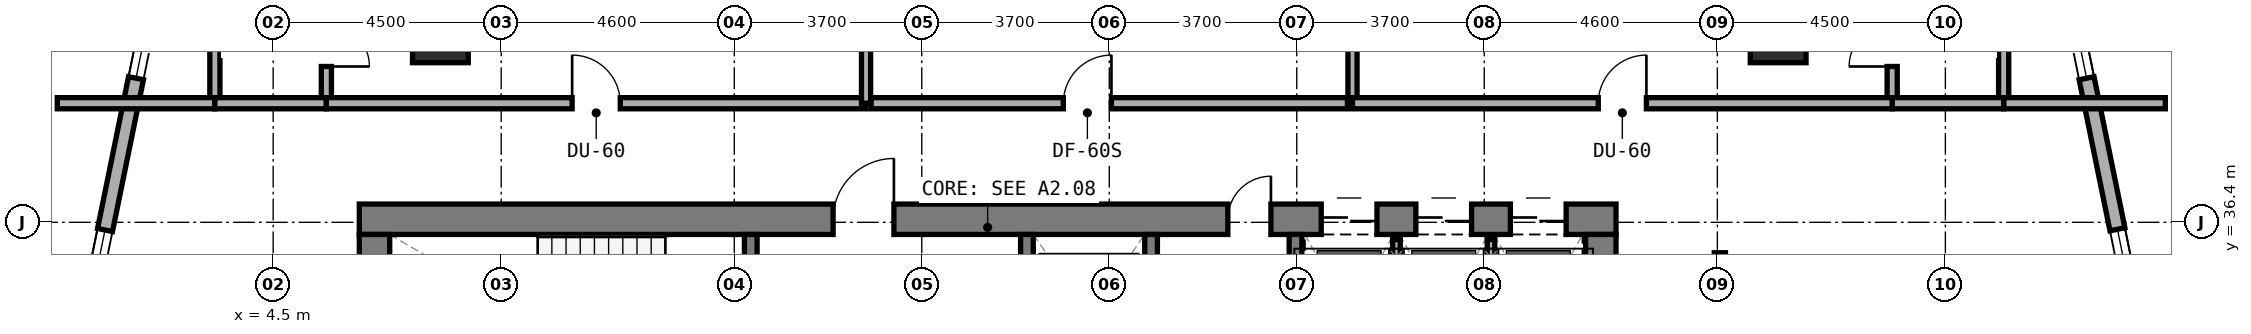
"""IFC4 building model, lengths in metres.
Left out: names, types, materials, properties, quantities, classifications, styles, units other than length and angle.
Written with IfcOpenShell. Run it as: python <this file> out.ifc"""

import sys

from ifc_helpers import new_model, si_unit, direction, frame, frame_2d, origin, origin_2d, place, context, subcontext, project, spatial, rectangle, extrude, element, fill, save


model = new_model("IFC4")
c1 = context("Model", 3, precision=1e-05, world=origin(), true_north=direction((0.0, 1.0)))
c2 = subcontext(c1, "Body", "Model", "MODEL_VIEW")
j1 = project(units=[si_unit("LENGTHUNIT", "METRE"), si_unit("PLANEANGLEUNIT", "RADIAN")], contexts=[c1])
p1 = place(None, origin())
s1 = spatial("IfcSite", under=j1, at=p1, CompositionType="ELEMENT")
p2 = place(p1, origin())
s2 = spatial("IfcBuilding", under=s1, at=p2, CompositionType="ELEMENT")
p3 = place(p2, frame((0.0, 0.0, 24.0)))
s3 = spatial("IfcBuildingStorey", under=s2, at=p3, CompositionType="ELEMENT", Elevation=24.0)
p4 = place(p3, frame((6.2, 36.46, 0.0), z_axis=(0.0, 0.0, 1.0), x_axis=(1.0, 0.0, 0.0)))
e1 = element("IfcWall", 1, at=p4, inside=s3, PredefinedType="SHEAR", context=c2, shape_type="SweptSolid", body=[
    extrude(rectangle(XDim=24.8, YDim=0.6, at=frame_2d((12.4, 0.0))), origin(), (0.0, 0.0, 1.0), 3.5),
])
p5 = place(p4, frame((9.35, 0.0, 0.0)))
e2 = element("IfcOpeningElement", 2, at=p5, cuts=e1, PredefinedType="OPENING", context=c2, shape_type="SweptSolid", body=[
    extrude(rectangle(XDim=1.2, YDim=2.15, at=frame_2d((0.6, 1.075))), frame((0.0, 0.31, 0.0), z_axis=(0.0, -1.0, 0.0), x_axis=(1.0, 0.0, 0.0)), (0.0, 0.0, 1.0), 0.62),
])
p6 = place(p4, frame((17.14, 0.0, 0.0)))
e3 = element("IfcOpeningElement", 3, at=p6, cuts=e1, PredefinedType="OPENING", context=c2, shape_type="SweptSolid", body=[
    extrude(rectangle(XDim=0.85, YDim=2.1, at=frame_2d((0.425, 1.05))), frame((0.0, 0.31, 0.0), z_axis=(0.0, -1.0, 0.0), x_axis=(1.0, 0.0, 0.0)), (0.0, 0.0, 1.0), 0.62),
])
p7 = place(p4, frame((18.983, 0.0, 0.0)))
e4 = element("IfcOpeningElement", 4, at=p7, cuts=e1, PredefinedType="OPENING", context=c2, shape_type="SweptSolid", body=[
    extrude(rectangle(XDim=1.1, YDim=2.15, at=frame_2d((0.55, 1.075))), frame((0.0, 0.31, 0.0), z_axis=(0.0, -1.0, 0.0), x_axis=(1.0, 0.0, 0.0)), (0.0, 0.0, 1.0), 0.62),
])
p8 = place(p4, frame((20.85, 0.0, 0.0)))
e5 = element("IfcOpeningElement", 5, at=p8, cuts=e1, PredefinedType="OPENING", context=c2, shape_type="SweptSolid", body=[
    extrude(rectangle(XDim=1.1, YDim=2.15, at=frame_2d((0.55, 1.075))), frame((0.0, 0.31, 0.0), z_axis=(0.0, -1.0, 0.0), x_axis=(1.0, 0.0, 0.0)), (0.0, 0.0, 1.0), 0.62),
])
p9 = place(p4, frame((22.716, 0.0, 0.0)))
e6 = element("IfcOpeningElement", 6, at=p9, cuts=e1, PredefinedType="OPENING", context=c2, shape_type="SweptSolid", body=[
    extrude(rectangle(XDim=1.1, YDim=2.15, at=frame_2d((0.55, 1.075))), frame((0.0, 0.31, 0.0), z_axis=(0.0, -1.0, 0.0), x_axis=(1.0, 0.0, 0.0)), (0.0, 0.0, 1.0), 0.62),
])
for number, where, z_axis, x_axis in (
    (7, (6.5, 33.0, 0.0), (0.0, 0.0, 1.0), (0.0, 1.0, 0.0)),
    (8, (30.7, 33.0, 0.0), (0.0, 0.0, 1.0), (0.0, 1.0, 0.0)),
):
    element("IfcWall", number, at=place(p3, frame(where, z_axis=z_axis, x_axis=x_axis)), inside=s3, PredefinedType="SHEAR", context=c2, shape_type="SweptSolid", body=[
        extrude(rectangle(XDim=3.16, YDim=0.6, at=frame_2d((1.58, 0.0))), origin(), (0.0, 0.0, 1.0), 3.5),
    ])
p10 = place(p3, frame((13.925, 33.0, 0.0), z_axis=(0.0, 0.0, 1.0), x_axis=(0.0, 1.0, 0.0)))
e9 = element("IfcWall", 9, at=p10, inside=s3, PredefinedType="STANDARD", context=c2, shape_type="SweptSolid", body=[
    extrude(rectangle(XDim=3.16, YDim=0.25, at=frame_2d((1.58, 0.0))), origin(), (0.0, 0.0, 1.0), 3.22),
])
p11 = place(p10, frame((0.98, 0.0, 0.0)))
e10 = element("IfcOpeningElement", 10, at=p11, cuts=e9, PredefinedType="OPENING", context=c2, shape_type="SweptSolid", body=[
    extrude(rectangle(XDim=1.1, YDim=2.15, at=frame_2d((0.55, 1.075))), frame((0.0, 0.135, 0.0), z_axis=(0.0, -1.0, 0.0), x_axis=(1.0, 0.0, 0.0)), (0.0, 0.0, 1.0), 0.27),
])
p12 = place(p3, frame((19.375, 33.0, 0.0), z_axis=(0.0, 0.0, 1.0), x_axis=(0.0, 1.0, 0.0)))
e11 = element("IfcWall", 11, at=p12, inside=s3, PredefinedType="STANDARD", context=c2, shape_type="SweptSolid", body=[
    extrude(rectangle(XDim=3.16, YDim=0.25, at=frame_2d((1.58, 0.0))), origin(), (0.0, 0.0, 1.0), 3.22),
])
p13 = place(p12, frame((0.98, 0.0, 0.0)))
e12 = element("IfcOpeningElement", 12, at=p13, cuts=e11, PredefinedType="OPENING", context=c2, shape_type="SweptSolid", body=[
    extrude(rectangle(XDim=1.1, YDim=2.15, at=frame_2d((0.55, 1.075))), frame((0.0, 0.135, 0.0), z_axis=(0.0, -1.0, 0.0), x_axis=(1.0, 0.0, 0.0)), (0.0, 0.0, 1.0), 0.27),
])
for number, where, z_axis, x_axis in (
    (13, (21.825, 33.0, 0.0), (0.0, 0.0, 1.0), (0.0, 1.0, 0.0)),
    (14, (24.675, 33.0, 0.0), (0.0, 0.0, 1.0), (0.0, 1.0, 0.0)),
):
    element("IfcWall", number, at=place(p3, frame(where, z_axis=z_axis, x_axis=x_axis)), inside=s3, PredefinedType="STANDARD", context=c2, shape_type="SweptSolid", body=[
        extrude(rectangle(XDim=3.16, YDim=0.25, at=frame_2d((1.58, 0.0))), origin(), (0.0, 0.0, 1.0), 3.22),
    ])
for number, where, z_axis, x_axis in (
    (15, (34.2, 40.2, 0.0), (0.0, 0.0, 1.0), (1.0, 0.0, 0.0)),
    (16, (7.8, 40.2, 0.0), (0.0, 0.0, 1.0), (1.0, 0.0, 0.0)),
):
    element("IfcColumn", number, at=place(p3, frame(where, z_axis=z_axis, x_axis=x_axis)), inside=s3, PredefinedType="COLUMN", context=c2, shape_type="SweptSolid", body=[
        extrude(rectangle(XDim=1.1, YDim=1.3, at=origin_2d()), origin(), (0.0, 0.0, 1.0), 3.5),
    ])
p14 = place(p3, frame((41.858, 31.546, 0.0), z_axis=(0.0, 0.0, 1.0), x_axis=(-0.19998861198, 0.979798221614, 0.0)))
e17 = element("IfcWall", 17, at=p14, inside=s3, PredefinedType="STANDARD", context=c2, shape_type="SweptSolid", body=[
    extrude(rectangle(XDim=10.035, YDim=0.3, at=frame_2d((5.017, 0.0))), origin(), (0.0, 0.0, 1.0), 3.22),
])
p15 = place(p14, frame((2.414, 0.0, 0.8)))
e18 = element("IfcOpeningElement", 18, at=p15, cuts=e17, PredefinedType="OPENING", context=c2, shape_type="SweptSolid", body=[
    extrude(rectangle(XDim=2.4, YDim=1.6, at=frame_2d((1.2, 0.8))), frame((0.0, 0.16, 0.0), z_axis=(0.0, -1.0, 0.0), x_axis=(1.0, 0.0, 0.0)), (0.0, 0.0, 1.0), 0.32),
])
p16 = place(p14, frame((7.856, 0.0, 0.85)))
e19 = element("IfcOpeningElement", 19, at=p16, cuts=e17, PredefinedType="OPENING", context=c2, shape_type="SweptSolid", body=[
    extrude(rectangle(XDim=1.8, YDim=1.5, at=frame_2d((0.9, 0.75))), frame((0.0, 0.16, 0.0), z_axis=(0.0, -1.0, 0.0), x_axis=(1.0, 0.0, 0.0)), (0.0, 0.0, 1.0), 0.32),
])
p17 = place(p3, frame((2.229, 41.378, 0.0), z_axis=(0.0, 0.0, 1.0), x_axis=(-0.199990901713, -0.979797754249, 0.0)))
e20 = element("IfcWall", 20, at=p17, inside=s3, PredefinedType="STANDARD", context=c2, shape_type="SweptSolid", body=[
    extrude(rectangle(XDim=10.065, YDim=0.3, at=frame_2d((5.033, 0.0))), origin(), (0.0, 0.0, 1.0), 3.22),
])
p18 = place(p17, frame((0.378, 0.0, 0.85)))
e21 = element("IfcOpeningElement", 21, at=p18, cuts=e20, PredefinedType="OPENING", context=c2, shape_type="SweptSolid", body=[
    extrude(rectangle(XDim=1.8, YDim=1.5, at=frame_2d((0.9, 0.75))), frame((0.0, 0.16, 0.0), z_axis=(0.0, -1.0, 0.0), x_axis=(1.0, 0.0, 0.0)), (0.0, 0.0, 1.0), 0.32),
])
p19 = place(p17, frame((5.236, 0.0, 0.8)))
e22 = element("IfcOpeningElement", 22, at=p19, cuts=e20, PredefinedType="OPENING", context=c2, shape_type="SweptSolid", body=[
    extrude(rectangle(XDim=2.4, YDim=1.6, at=frame_2d((1.2, 0.8))), frame((0.0, 0.16, 0.0), z_axis=(0.0, -1.0, 0.0), x_axis=(1.0, 0.0, 0.0)), (0.0, 0.0, 1.0), 0.32),
])
p20 = place(p3, frame((26.667, 33.1, 0.0), z_axis=(0.0, 0.0, 1.0), x_axis=(0.0, 1.0, 0.0)))
e23 = element("IfcWall", 23, at=p20, inside=s3, PredefinedType="PARTITIONING", context=c2, shape_type="SweptSolid", body=[
    extrude(rectangle(XDim=2.96, YDim=0.15, at=frame_2d((1.48, 0.0))), origin(), (0.0, 0.0, 1.0), 3.22),
])
p21 = place(p3, frame((28.533, 33.1, 0.0), z_axis=(0.0, 0.0, 1.0), x_axis=(0.0, 1.0, 0.0)))
e24 = element("IfcWall", 24, at=p21, inside=s3, PredefinedType="PARTITIONING", context=c2, shape_type="SweptSolid", body=[
    extrude(rectangle(XDim=2.96, YDim=0.15, at=frame_2d((1.48, 0.0))), origin(), (0.0, 0.0, 1.0), 2.295),
])
p22 = place(p3, frame((5.55, 38.85, 0.0), z_axis=(0.0, 0.0, 1.0), x_axis=(0.0, 1.0, 0.0)))
e25 = element("IfcWall", 25, at=p22, inside=s3, PredefinedType="PLUMBINGWALL", context=c2, shape_type="SweptSolid", body=[
    extrude(rectangle(XDim=2.1, YDim=0.2, at=frame_2d((1.05, 0.0))), origin(), (0.0, 0.0, 1.0), 3.22),
])
p23 = place(p22, frame((0.625, 0.0, 0.0)))
e26 = element("IfcOpeningElement", 26, at=p23, cuts=e25, PredefinedType="OPENING", context=c2, shape_type="SweptSolid", body=[
    extrude(rectangle(XDim=0.85, YDim=2.1, at=frame_2d((0.425, 1.05))), frame((0.0, 0.11, 0.0), z_axis=(0.0, -1.0, 0.0), x_axis=(1.0, 0.0, 0.0)), (0.0, 0.0, 1.0), 0.22),
])
p24 = place(p3, frame((3.35, 38.85, 0.0), z_axis=(0.0, 0.0, 1.0), x_axis=(0.0, 1.0, 0.0)))
e27 = element("IfcWall", 27, at=p24, inside=s3, PredefinedType="PLUMBINGWALL", context=c2, shape_type="SweptSolid", body=[
    extrude(rectangle(XDim=2.1, YDim=0.2, at=frame_2d((1.05, 0.0))), origin(), (0.0, 0.0, 1.0), 3.22),
])
p25 = place(p3, frame((0.24, 38.75, 0.0), z_axis=(0.0, 0.0, 1.0), x_axis=(1.0, 0.0, 0.0)))
e28 = element("IfcWall", 28, at=p25, inside=s3, PredefinedType="SOLIDWALL", context=c2, shape_type="SweptSolid", body=[
    extrude(rectangle(XDim=3.11, YDim=0.22, at=frame_2d((1.555, 0.0))), origin(), (0.0, 0.0, 1.0), 3.22),
])
p26 = place(p3, frame((3.35, 38.75, 0.0), z_axis=(0.0, 0.0, 1.0), x_axis=(1.0, 0.0, 0.0)))
e29 = element("IfcWall", 29, at=p26, inside=s3, PredefinedType="SOLIDWALL", context=c2, shape_type="SweptSolid", body=[
    extrude(rectangle(XDim=2.2, YDim=0.22, at=frame_2d((1.1, 0.0))), origin(), (0.0, 0.0, 1.0), 3.22),
])
p27 = place(p3, frame((5.55, 38.75, 0.0), z_axis=(0.0, 0.0, 1.0), x_axis=(1.0, 0.0, 0.0)))
e30 = element("IfcWall", 30, at=p27, inside=s3, PredefinedType="SOLIDWALL", context=c2, shape_type="SweptSolid", body=[
    extrude(rectangle(XDim=10.65, YDim=0.22, at=frame_2d((5.325, 0.0))), origin(), (0.0, 0.0, 1.0), 2.295),
])
p28 = place(p27, frame((4.85, 0.0, 0.0)))
e31 = element("IfcOpeningElement", 31, at=p28, cuts=e30, PredefinedType="OPENING", context=c2, shape_type="SweptSolid", body=[
    extrude(rectangle(XDim=0.95, YDim=2.1, at=frame_2d((0.475, 1.05))), frame((0.0, 0.12, 0.0), z_axis=(0.0, -1.0, 0.0), x_axis=(1.0, 0.0, 0.0)), (0.0, 0.0, 1.0), 0.24),
])
p29 = place(p3, frame((16.2, 38.75, 0.0), z_axis=(0.0, 0.0, 1.0), x_axis=(0.0, 1.0, 0.0)))
e32 = element("IfcWall", 32, at=p29, inside=s3, PredefinedType="SOLIDWALL", context=c2, shape_type="SweptSolid", body=[
    extrude(rectangle(XDim=8.19, YDim=0.18, at=frame_2d((4.095, 0.0))), origin(), (0.0, 0.0, 1.0), 2.295),
])
p30 = place(p3, frame((16.3, 38.75, 0.0), z_axis=(0.0, 0.0, 1.0), x_axis=(1.0, 0.0, 0.0)))
e33 = element("IfcWall", 33, at=p30, inside=s3, PredefinedType="SOLIDWALL", context=c2, shape_type="SweptSolid", body=[
    extrude(rectangle(XDim=9.4, YDim=0.22, at=frame_2d((4.7, 0.0))), origin(), (0.0, 0.0, 1.0), 2.955),
])
p31 = place(p30, frame((3.793, 0.0, 0.0)))
e34 = element("IfcOpeningElement", 34, at=p31, cuts=e33, PredefinedType="OPENING", context=c2, shape_type="SweptSolid", body=[
    extrude(rectangle(XDim=0.95, YDim=2.1, at=frame_2d((0.475, 1.05))), frame((0.0, 0.12, 0.0), z_axis=(0.0, -1.0, 0.0), x_axis=(1.0, 0.0, 0.0)), (0.0, 0.0, 1.0), 0.24),
])
p32 = place(p3, frame((25.8, 38.75, 0.0), z_axis=(0.0, 0.0, 1.0), x_axis=(0.0, 1.0, 0.0)))
e35 = element("IfcWall", 35, at=p32, inside=s3, PredefinedType="SOLIDWALL", context=c2, shape_type="SweptSolid", body=[
    extrude(rectangle(XDim=8.19, YDim=0.18, at=frame_2d((4.095, 0.0))), origin(), (0.0, 0.0, 1.0), 2.295),
])
p33 = place(p3, frame((36.45, 38.85, 0.0), z_axis=(0.0, 0.0, 1.0), x_axis=(0.0, 1.0, 0.0)))
e36 = element("IfcWall", 36, at=p33, inside=s3, PredefinedType="PLUMBINGWALL", context=c2, shape_type="SweptSolid", body=[
    extrude(rectangle(XDim=2.1, YDim=0.2, at=frame_2d((1.05, 0.0))), origin(), (0.0, 0.0, 1.0), 3.22),
])
p34 = place(p33, frame((0.625, 0.0, 0.0)))
e37 = element("IfcOpeningElement", 37, at=p34, cuts=e36, PredefinedType="OPENING", context=c2, shape_type="SweptSolid", body=[
    extrude(rectangle(XDim=0.85, YDim=2.1, at=frame_2d((0.425, 1.05))), frame((0.0, 0.11, 0.0), z_axis=(0.0, -1.0, 0.0), x_axis=(1.0, 0.0, 0.0)), (0.0, 0.0, 1.0), 0.22),
])
p35 = place(p3, frame((38.65, 38.85, 0.0), z_axis=(0.0, 0.0, 1.0), x_axis=(0.0, 1.0, 0.0)))
e38 = element("IfcWall", 38, at=p35, inside=s3, PredefinedType="PLUMBINGWALL", context=c2, shape_type="SweptSolid", body=[
    extrude(rectangle(XDim=2.1, YDim=0.2, at=frame_2d((1.05, 0.0))), origin(), (0.0, 0.0, 1.0), 3.22),
])
p36 = place(p3, frame((38.65, 38.75, 0.0), z_axis=(0.0, 0.0, 1.0), x_axis=(1.0, 0.0, 0.0)))
e39 = element("IfcWall", 39, at=p36, inside=s3, PredefinedType="SOLIDWALL", context=c2, shape_type="SweptSolid", body=[
    extrude(rectangle(XDim=3.19, YDim=0.22, at=frame_2d((1.595, 0.0))), origin(), (0.0, 0.0, 1.0), 3.22),
])
p37 = place(p3, frame((36.45, 38.75, 0.0), z_axis=(0.0, 0.0, 1.0), x_axis=(1.0, 0.0, 0.0)))
e40 = element("IfcWall", 40, at=p37, inside=s3, PredefinedType="SOLIDWALL", context=c2, shape_type="SweptSolid", body=[
    extrude(rectangle(XDim=2.2, YDim=0.22, at=frame_2d((1.1, 0.0))), origin(), (0.0, 0.0, 1.0), 3.22),
])
p38 = place(p3, frame((25.8, 38.75, 0.0), z_axis=(0.0, 0.0, 1.0), x_axis=(1.0, 0.0, 0.0)))
e41 = element("IfcWall", 41, at=p38, inside=s3, PredefinedType="SOLIDWALL", context=c2, shape_type="SweptSolid", body=[
    extrude(rectangle(XDim=10.65, YDim=0.22, at=frame_2d((5.325, 0.0))), origin(), (0.0, 0.0, 1.0), 2.295),
])
p39 = place(p38, frame((4.85, 0.0, 0.0)))
e42 = element("IfcOpeningElement", 42, at=p39, cuts=e41, PredefinedType="OPENING", context=c2, shape_type="SweptSolid", body=[
    extrude(rectangle(XDim=0.95, YDim=2.1, at=frame_2d((0.475, 1.05))), frame((0.0, 0.12, 0.0), z_axis=(0.0, -1.0, 0.0), x_axis=(1.0, 0.0, 0.0)), (0.0, 0.0, 1.0), 0.24),
])
p40 = place(p3, frame((33.05, 27.2, 0.0), z_axis=(0.0, 0.0, 1.0), x_axis=(0.0, 1.0, 0.0)))
e43 = element("IfcWall", 43, at=p40, inside=s3, PredefinedType="SOLIDWALL", context=c2, shape_type="SweptSolid", body=[
    extrude(rectangle(XDim=8.6, YDim=0.22, at=frame_2d((4.3, 0.0))), origin(), (0.0, 0.0, 1.0), 2.295),
])
p41 = place(p40, frame((3.825, 0.0, 0.0)))
e44 = element("IfcOpeningElement", 44, at=p41, cuts=e43, PredefinedType="OPENING", context=c2, shape_type="SweptSolid", body=[
    extrude(rectangle(XDim=0.95, YDim=2.1, at=frame_2d((0.475, 1.05))), frame((0.0, 0.12, 0.0), z_axis=(0.0, -1.0, 0.0), x_axis=(1.0, 0.0, 0.0)), (0.0, 0.0, 1.0), 0.24),
])
p42 = place(p15, origin())
e45 = element("IfcWindow", 45, at=p42, inside=s3, PartitioningType="SINGLE_PANEL", PredefinedType="WINDOW", context=c2, shape_type="SweptSolid", body=[
    extrude(rectangle(XDim=2.4, YDim=1.6, at=frame_2d((1.2, 0.8))), frame((0.0, 0.03, 0.0), z_axis=(0.0, -1.0, 0.0), x_axis=(1.0, 0.0, 0.0)), (0.0, 0.0, 1.0), 0.06),
])
fill(e18, e45)
p43 = place(p16, origin())
e46 = element("IfcWindow", 46, at=p43, inside=s3, PartitioningType="SINGLE_PANEL", PredefinedType="WINDOW", context=c2, shape_type="SweptSolid", body=[
    extrude(rectangle(XDim=1.8, YDim=1.5, at=frame_2d((0.9, 0.75))), frame((0.0, 0.03, 0.0), z_axis=(0.0, -1.0, 0.0), x_axis=(1.0, 0.0, 0.0)), (0.0, 0.0, 1.0), 0.06),
])
fill(e19, e46)
p44 = place(p18, origin())
e47 = element("IfcWindow", 47, at=p44, inside=s3, PartitioningType="SINGLE_PANEL", PredefinedType="WINDOW", context=c2, shape_type="SweptSolid", body=[
    extrude(rectangle(XDim=1.8, YDim=1.5, at=frame_2d((0.9, 0.75))), frame((0.0, 0.03, 0.0), z_axis=(0.0, -1.0, 0.0), x_axis=(1.0, 0.0, 0.0)), (0.0, 0.0, 1.0), 0.06),
])
fill(e21, e47)
p45 = place(p19, origin())
e48 = element("IfcWindow", 48, at=p45, inside=s3, PartitioningType="SINGLE_PANEL", PredefinedType="WINDOW", context=c2, shape_type="SweptSolid", body=[
    extrude(rectangle(XDim=2.4, YDim=1.6, at=frame_2d((1.2, 0.8))), frame((0.0, 0.03, 0.0), z_axis=(0.0, -1.0, 0.0), x_axis=(1.0, 0.0, 0.0)), (0.0, 0.0, 1.0), 0.06),
])
fill(e22, e48)
p46 = place(p5, origin())
e49 = element("IfcDoor", 49, at=p46, inside=s3, OperationType="SINGLE_SWING_RIGHT", PredefinedType="DOOR", context=c2, shape_type="SweptSolid", body=[
    extrude(rectangle(XDim=1.2, YDim=2.15, at=frame_2d((0.6, 1.075))), frame((0.0, 0.025, 0.0), z_axis=(0.0, -1.0, 0.0), x_axis=(1.0, 0.0, 0.0)), (0.0, 0.0, 1.0), 0.05),
])
fill(e2, e49)
p47 = place(p6, origin())
e50 = element("IfcDoor", 50, at=p47, inside=s3, OperationType="SINGLE_SWING_RIGHT", PredefinedType="DOOR", context=c2, shape_type="SweptSolid", body=[
    extrude(rectangle(XDim=0.85, YDim=2.1, at=frame_2d((0.425, 1.05))), frame((0.0, 0.025, 0.0), z_axis=(0.0, -1.0, 0.0), x_axis=(1.0, 0.0, 0.0)), (0.0, 0.0, 1.0), 0.05),
])
fill(e3, e50)
p48 = place(p7, origin())
e51 = element("IfcDoor", 51, at=p48, inside=s3, OperationType="DOUBLE_DOOR_SLIDING", PredefinedType="DOOR", context=c2, shape_type="SweptSolid", body=[
    extrude(rectangle(XDim=1.1, YDim=2.15, at=frame_2d((0.55, 1.075))), frame((0.0, 0.025, 0.0), z_axis=(0.0, -1.0, 0.0), x_axis=(1.0, 0.0, 0.0)), (0.0, 0.0, 1.0), 0.05),
])
fill(e4, e51)
p49 = place(p8, origin())
e52 = element("IfcDoor", 52, at=p49, inside=s3, OperationType="DOUBLE_DOOR_SLIDING", PredefinedType="DOOR", context=c2, shape_type="SweptSolid", body=[
    extrude(rectangle(XDim=1.1, YDim=2.15, at=frame_2d((0.55, 1.075))), frame((0.0, 0.025, 0.0), z_axis=(0.0, -1.0, 0.0), x_axis=(1.0, 0.0, 0.0)), (0.0, 0.0, 1.0), 0.05),
])
fill(e5, e52)
p50 = place(p9, origin())
e53 = element("IfcDoor", 53, at=p50, inside=s3, OperationType="DOUBLE_DOOR_SLIDING", PredefinedType="DOOR", context=c2, shape_type="SweptSolid", body=[
    extrude(rectangle(XDim=1.1, YDim=2.15, at=frame_2d((0.55, 1.075))), frame((0.0, 0.025, 0.0), z_axis=(0.0, -1.0, 0.0), x_axis=(1.0, 0.0, 0.0)), (0.0, 0.0, 1.0), 0.05),
])
fill(e6, e53)
p51 = place(p23, frame((0.85, 0.0, 0.0), z_axis=(0.0, 0.0, 1.0), x_axis=(-1.0, 0.0, 0.0)))
e54 = element("IfcDoor", 54, at=p51, inside=s3, OperationType="SINGLE_SWING_RIGHT", PredefinedType="DOOR", context=c2, shape_type="SweptSolid", body=[
    extrude(rectangle(XDim=0.85, YDim=2.1, at=frame_2d((0.425, 1.05))), frame((0.0, 0.025, 0.0), z_axis=(0.0, -1.0, 0.0), x_axis=(1.0, 0.0, 0.0)), (0.0, 0.0, 1.0), 0.05),
])
fill(e26, e54)
p52 = place(p28, origin())
e55 = element("IfcDoor", 55, at=p52, inside=s3, OperationType="SINGLE_SWING_LEFT", PredefinedType="DOOR", context=c2, shape_type="SweptSolid", body=[
    extrude(rectangle(XDim=0.95, YDim=2.1, at=frame_2d((0.475, 1.05))), frame((0.0, 0.025, 0.0), z_axis=(0.0, -1.0, 0.0), x_axis=(1.0, 0.0, 0.0)), (0.0, 0.0, 1.0), 0.05),
])
fill(e31, e55)
p53 = place(p31, origin())
e56 = element("IfcDoor", 56, at=p53, inside=s3, OperationType="SINGLE_SWING_RIGHT", PredefinedType="DOOR", context=c2, shape_type="SweptSolid", body=[
    extrude(rectangle(XDim=0.95, YDim=2.1, at=frame_2d((0.475, 1.05))), frame((0.0, 0.025, 0.0), z_axis=(0.0, -1.0, 0.0), x_axis=(1.0, 0.0, 0.0)), (0.0, 0.0, 1.0), 0.05),
])
fill(e34, e56)
p54 = place(p34, origin())
e57 = element("IfcDoor", 57, at=p54, inside=s3, OperationType="SINGLE_SWING_LEFT", PredefinedType="DOOR", context=c2, shape_type="SweptSolid", body=[
    extrude(rectangle(XDim=0.85, YDim=2.1, at=frame_2d((0.425, 1.05))), frame((0.0, 0.025, 0.0), z_axis=(0.0, -1.0, 0.0), x_axis=(1.0, 0.0, 0.0)), (0.0, 0.0, 1.0), 0.05),
])
fill(e37, e57)
p55 = place(p39, origin())
e58 = element("IfcDoor", 58, at=p55, inside=s3, OperationType="SINGLE_SWING_RIGHT", PredefinedType="DOOR", context=c2, shape_type="SweptSolid", body=[
    extrude(rectangle(XDim=0.95, YDim=2.1, at=frame_2d((0.475, 1.05))), frame((0.0, 0.025, 0.0), z_axis=(0.0, -1.0, 0.0), x_axis=(1.0, 0.0, 0.0)), (0.0, 0.0, 1.0), 0.05),
])
fill(e42, e58)
save(model, sys.argv[1])
